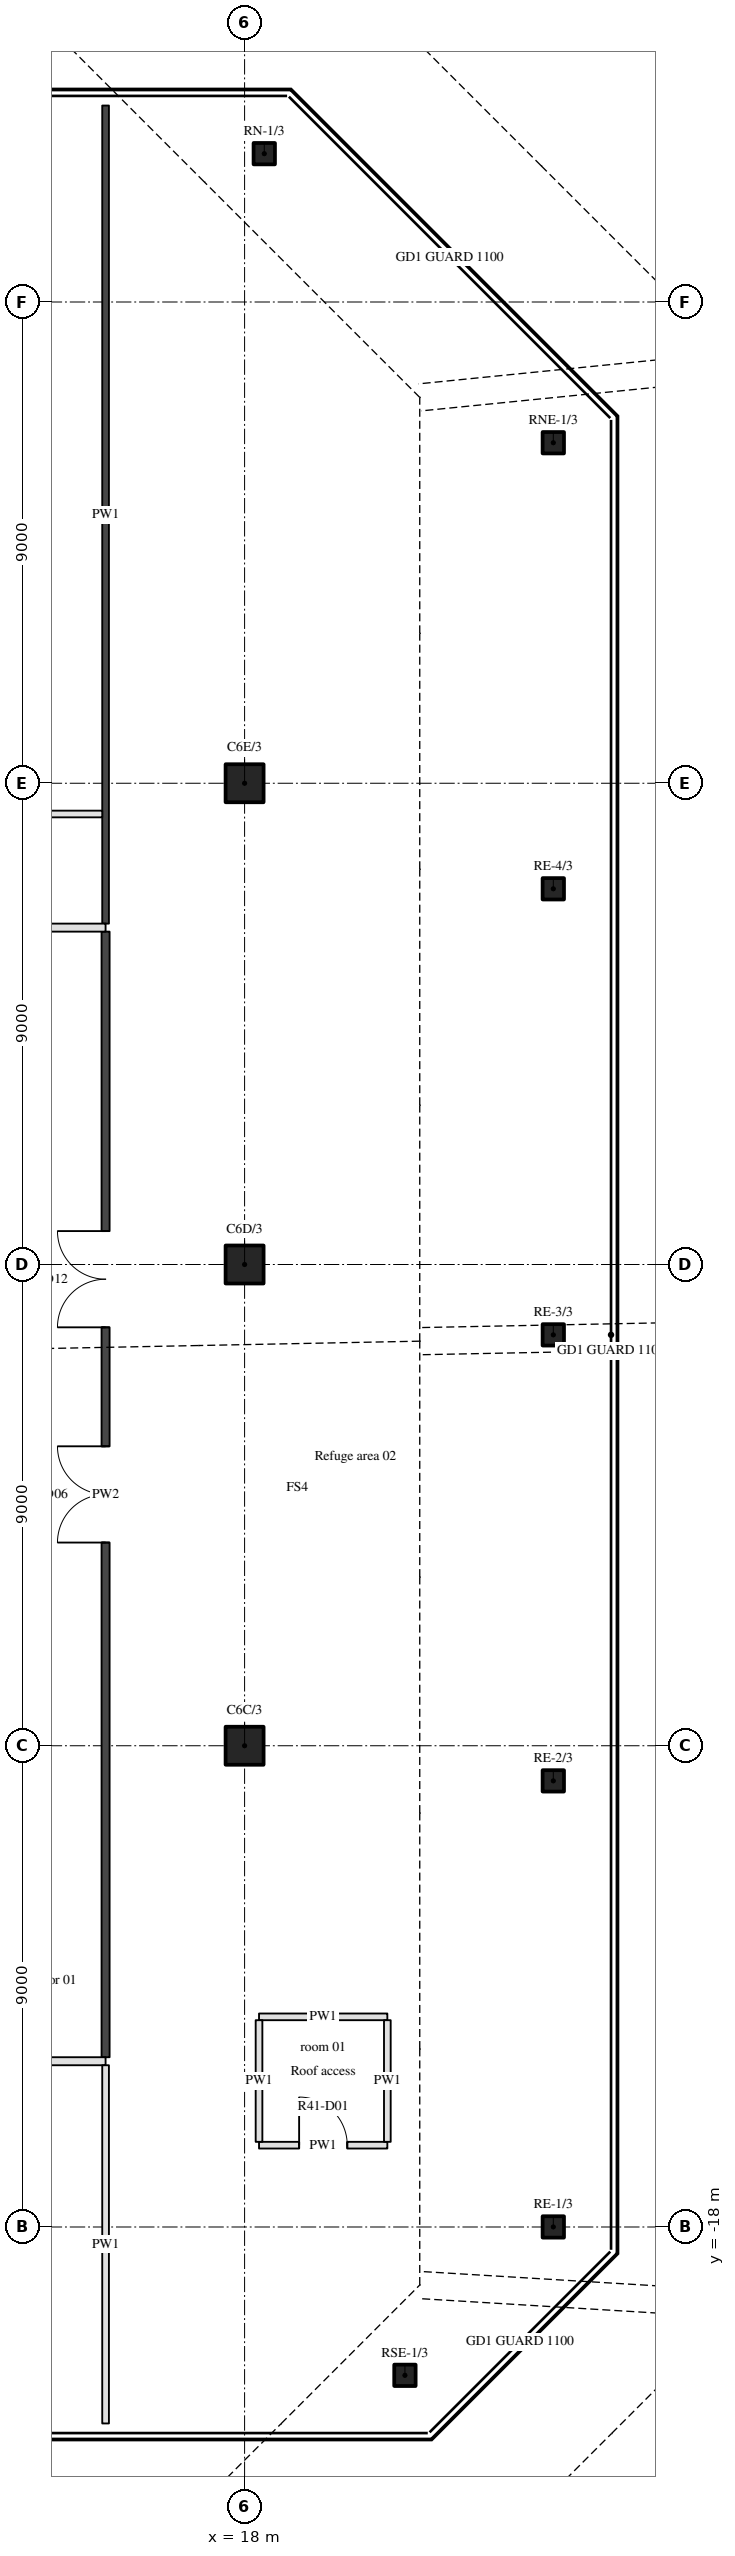
"""IFC4 building model, lengths in metres.
Left out: names, types, materials, properties, quantities, classifications, styles, units other than length and angle.
Written with IfcOpenShell. Run it as: python <this file> out.ifc"""

import sys

from ifc_helpers import new_model, si_unit, direction, frame, frame_2d, origin, origin_2d, place, context, subcontext, project, spatial, rectangle, hollow_rectangle, hollow_circle, extrude, element, fill, save


model = new_model("IFC4")
c1 = context("Model", 3, precision=1e-05, world=origin(), true_north=direction((0.0, 1.0)))
c2 = subcontext(c1, "Body", "Model", "MODEL_VIEW")
j1 = project(units=[si_unit("LENGTHUNIT", "METRE"), si_unit("PLANEANGLEUNIT", "RADIAN")], contexts=[c1])
p1 = place(None, origin())
s1 = spatial("IfcSite", under=j1, at=p1, CompositionType="ELEMENT")
p2 = place(p1, origin())
s2 = spatial("IfcBuilding", under=s1, at=p2, CompositionType="ELEMENT")
p3 = place(p2, frame((0.0, 0.0, 167.7)))
s3 = spatial("IfcBuildingStorey", under=s2, at=p3, CompositionType="ELEMENT", Elevation=167.7)
for number, where, z_axis, x_axis in (
    (1, (18.0, -9.0, 0.0), (0.0, 0.0, 1.0), (1.0, 0.0, 0.0)),
    (2, (18.0, 0.0, 0.0), (0.0, 0.0, 1.0), (1.0, 0.0, 0.0)),
    (3, (18.0, 9.0, 0.0), (0.0, 0.0, 1.0), (1.0, 0.0, 0.0)),
):
    element("IfcColumn", number, at=place(p3, frame(where, z_axis=z_axis, x_axis=x_axis)), inside=s3, PredefinedType="COLUMN", context=c2, shape_type="SweptSolid", body=[
        extrude(hollow_circle(Radius=0.355, WallThickness=0.032, at=origin_2d()), origin(), (0.0, 0.0, 1.0), 4.08),
    ])
for number, where, z_axis, x_axis in (
    (4, (20.999, -20.774, 0.0), (0.0, 0.0, 1.0), (1.0, 0.0, 0.0)),
    (5, (23.774, -17.999, 0.0), (0.0, 0.0, 1.0), (1.0, 0.0, 0.0)),
    (6, (23.774, -9.657, 0.0), (0.0, 0.0, 1.0), (1.0, 0.0, 0.0)),
    (7, (23.774, -1.316, 0.0), (0.0, 0.0, 1.0), (1.0, 0.0, 0.0)),
    (8, (23.774, 7.026, 0.0), (0.0, 0.0, 1.0), (1.0, 0.0, 0.0)),
    (9, (23.774, 15.368, 0.0), (0.0, 0.0, 1.0), (1.0, 0.0, 0.0)),
    (10, (18.368, 20.774, 0.0), (0.0, 0.0, 1.0), (1.0, 0.0, 0.0)),
):
    element("IfcColumn", number, at=place(p3, frame(where, z_axis=z_axis, x_axis=x_axis)), inside=s3, PredefinedType="COLUMN", context=c2, shape_type="SweptSolid", body=[
        extrude(hollow_rectangle(XDim=0.4, YDim=0.4, WallThickness=0.02, InnerFilletRadius=0.03, OuterFilletRadius=0.05, at=origin_2d()), origin(), (0.0, 0.0, 1.0), 4.25),
    ])
p4 = place(p3, frame((18.27, -16.47, 0.0), z_axis=(0.0, 0.0, 1.0), x_axis=(1.0, 0.0, 0.0)))
e11 = element("IfcWall", 11, at=p4, inside=s3, PredefinedType="PARTITIONING", context=c2, shape_type="SweptSolid", body=[
    extrude(rectangle(XDim=2.4, YDim=0.125, at=frame_2d((1.2, 0.0))), origin(), (0.0, 0.0, 1.0), 3.56),
])
p5 = place(p4, frame((0.75, 0.0, 0.0)))
e12 = element("IfcOpeningElement", 12, at=p5, cuts=e11, PredefinedType="OPENING", context=c2, shape_type="SweptSolid", body=[
    extrude(rectangle(XDim=0.9, YDim=2.1, at=frame_2d((0.45, 1.05))), frame((0.0, 0.073, 0.0), z_axis=(0.0, -1.0, 0.0), x_axis=(1.0, 0.0, 0.0)), (0.0, 0.0, 1.0), 0.145),
])
p6 = place(p3, frame((-15.4, -14.9, 0.0), z_axis=(0.0, 0.0, 1.0), x_axis=(1.0, 0.0, 0.0)))
e13 = element("IfcWall", 13, at=p6, inside=s3, PredefinedType="PARTITIONING", context=c2, shape_type="SweptSolid", body=[
    extrude(rectangle(XDim=30.8, YDim=0.15, at=frame_2d((15.4, 0.0))), origin(), (0.0, 0.0, 1.0), 3.56),
])
p7 = place(p6, frame((14.5, 0.0, 0.0)))
e14 = element("IfcOpeningElement", 14, at=p7, cuts=e13, PredefinedType="OPENING", context=c2, shape_type="SweptSolid", body=[
    extrude(rectangle(XDim=1.8, YDim=2.1, at=frame_2d((0.9, 1.05))), frame((0.0, 0.085, 0.0), z_axis=(0.0, -1.0, 0.0), x_axis=(1.0, 0.0, 0.0)), (0.0, 0.0, 1.0), 0.17),
])
p8 = place(p6, frame((16.6, 0.0, 0.0)))
e15 = element("IfcOpeningElement", 15, at=p8, cuts=e13, PredefinedType="OPENING", context=c2, shape_type="SweptSolid", body=[
    extrude(rectangle(XDim=1.8, YDim=2.1, at=frame_2d((0.9, 1.05))), frame((0.0, 0.085, 0.0), z_axis=(0.0, -1.0, 0.0), x_axis=(1.0, 0.0, 0.0)), (0.0, 0.0, 1.0), 0.17),
])
p9 = place(p3, frame((18.27, -14.07, 0.0), z_axis=(0.0, 0.0, 1.0), x_axis=(1.0, 0.0, 0.0)))
e16 = element("IfcWall", 16, at=p9, inside=s3, PredefinedType="PARTITIONING", context=c2, shape_type="SweptSolid", body=[
    extrude(rectangle(XDim=2.4, YDim=0.125, at=frame_2d((1.2, 0.0))), origin(), (0.0, 0.0, 1.0), 3.56),
])
p10 = place(p3, frame((15.4, 6.3, 0.0), z_axis=(0.0, 0.0, 1.0), x_axis=(-1.0, 0.0, 0.0)))
e17 = element("IfcWall", 17, at=p10, inside=s3, PredefinedType="PARTITIONING", context=c2, shape_type="SweptSolid", body=[
    extrude(rectangle(XDim=15.95, YDim=0.15, at=frame_2d((7.975, 0.0))), origin(), (0.0, 0.0, 1.0), 3.56),
])
p11 = place(p10, frame((11.167, 0.0, 0.0)))
e18 = element("IfcOpeningElement", 18, at=p11, cuts=e17, PredefinedType="OPENING", context=c2, shape_type="SweptSolid", body=[
    extrude(rectangle(XDim=1.0, YDim=2.1, at=frame_2d((0.5, 1.05))), frame((0.0, 0.085, 0.0), z_axis=(0.0, -1.0, 0.0), x_axis=(1.0, 0.0, 0.0)), (0.0, 0.0, 1.0), 0.17),
])
p12 = place(p10, frame((14.475, 0.0, 0.0)))
e19 = element("IfcOpeningElement", 19, at=p12, cuts=e17, PredefinedType="OPENING", context=c2, shape_type="SweptSolid", body=[
    extrude(rectangle(XDim=1.0, YDim=2.1, at=frame_2d((0.5, 1.05))), frame((0.0, 0.085, 0.0), z_axis=(0.0, -1.0, 0.0), x_axis=(1.0, 0.0, 0.0)), (0.0, 0.0, 1.0), 0.17),
])
p13 = place(p10, frame((6.55, 0.0, 0.0)))
e20 = element("IfcOpeningElement", 20, at=p13, cuts=e17, PredefinedType="OPENING", context=c2, shape_type="SweptSolid", body=[
    extrude(rectangle(XDim=0.9, YDim=2.1, at=frame_2d((0.45, 1.05))), frame((0.0, 0.085, 0.0), z_axis=(0.0, -1.0, 0.0), x_axis=(1.0, 0.0, 0.0)), (0.0, 0.0, 1.0), 0.17),
])
p14 = place(p10, frame((1.884, 0.0, 0.0)))
e21 = element("IfcOpeningElement", 21, at=p14, cuts=e17, PredefinedType="OPENING", context=c2, shape_type="SweptSolid", body=[
    extrude(rectangle(XDim=0.9, YDim=2.1, at=frame_2d((0.45, 1.05))), frame((0.0, 0.085, 0.0), z_axis=(0.0, -1.0, 0.0), x_axis=(1.0, 0.0, 0.0)), (0.0, 0.0, 1.0), 0.17),
])
p15 = place(p3, frame((6.142, 8.425, 0.0), z_axis=(0.0, 0.0, 1.0), x_axis=(1.0, 0.0, 0.0)))
e22 = element("IfcWall", 22, at=p15, inside=s3, PredefinedType="PARTITIONING", context=c2, shape_type="SweptSolid", body=[
    extrude(rectangle(XDim=9.195, YDim=0.125, at=frame_2d((4.598, 0.0))), origin(), (0.0, 0.0, 1.0), 3.56),
])
p16 = place(p3, frame((15.4, -21.674, 0.0), z_axis=(0.0, 0.0, 1.0), x_axis=(0.0, 1.0, 0.0)))
e23 = element("IfcWall", 23, at=p16, inside=s3, PredefinedType="PARTITIONING", context=c2, shape_type="SweptSolid", body=[
    extrude(rectangle(XDim=6.699, YDim=0.125, at=frame_2d((3.35, 0.0))), origin(), (0.0, 0.0, 1.0), 3.56),
])
p17 = place(p3, frame((15.4, -14.825, 0.0), z_axis=(0.0, 0.0, 1.0), x_axis=(0.0, 1.0, 0.0)))
e24 = element("IfcWall", 24, at=p17, inside=s3, PredefinedType="PARTITIONING", context=c2, shape_type="SweptSolid", body=[
    extrude(rectangle(XDim=21.05, YDim=0.15, at=frame_2d((10.525, 0.0))), origin(), (0.0, 0.0, 1.0), 3.08),
])
p18 = place(p17, frame((9.625, 0.0, 0.0)))
e25 = element("IfcOpeningElement", 25, at=p18, cuts=e24, PredefinedType="OPENING", context=c2, shape_type="SweptSolid", body=[
    extrude(rectangle(XDim=1.8, YDim=2.1, at=frame_2d((0.9, 1.05))), frame((0.0, 0.085, 0.0), z_axis=(0.0, -1.0, 0.0), x_axis=(1.0, 0.0, 0.0)), (0.0, 0.0, 1.0), 0.17),
])
p19 = place(p17, frame((13.65, 0.0, 0.0)))
e26 = element("IfcOpeningElement", 26, at=p19, cuts=e24, PredefinedType="OPENING", context=c2, shape_type="SweptSolid", body=[
    extrude(rectangle(XDim=1.8, YDim=2.1, at=frame_2d((0.9, 1.05))), frame((0.0, 0.085, 0.0), z_axis=(0.0, -1.0, 0.0), x_axis=(1.0, 0.0, 0.0)), (0.0, 0.0, 1.0), 0.17),
])
p20 = place(p3, frame((15.4, 6.375, 0.0), z_axis=(0.0, 0.0, 1.0), x_axis=(0.0, 1.0, 0.0)))
e27 = element("IfcWall", 27, at=p20, inside=s3, PredefinedType="PARTITIONING", context=c2, shape_type="SweptSolid", body=[
    extrude(rectangle(XDim=15.299, YDim=0.125, at=frame_2d((7.649, 0.0))), origin(), (0.0, 0.0, 1.0), 3.08),
])
for number, where, z_axis, x_axis in (
    (28, (18.27, -16.407, 0.0), (0.0, 0.0, 1.0), (0.0, 1.0, 0.0)),
    (29, (20.67, -16.407, 0.0), (0.0, 0.0, 1.0), (0.0, 1.0, 0.0)),
):
    element("IfcWall", number, at=place(p3, frame(where, z_axis=z_axis, x_axis=x_axis)), inside=s3, PredefinedType="PARTITIONING", context=c2, shape_type="SweptSolid", body=[
        extrude(rectangle(XDim=2.275, YDim=0.125, at=frame_2d((1.137, 0.0))), origin(), (0.0, 0.0, 1.0), 3.56),
    ])
p21 = place(p18, origin())
e30 = element("IfcDoor", 30, at=p21, inside=s3, OperationType="DOUBLE_DOOR_SINGLE_SWING", PredefinedType="DOOR", context=c2, shape_type="SweptSolid", body=[
    extrude(rectangle(XDim=1.8, YDim=2.1, at=frame_2d((0.9, 1.05))), frame((0.0, 0.025, 0.0), z_axis=(0.0, -1.0, 0.0), x_axis=(1.0, 0.0, 0.0)), (0.0, 0.0, 1.0), 0.05),
])
fill(e25, e30)
p22 = place(p5, origin())
e31 = element("IfcDoor", 31, at=p22, inside=s3, OperationType="SINGLE_SWING_LEFT", PredefinedType="DOOR", context=c2, shape_type="SweptSolid", body=[
    extrude(rectangle(XDim=0.9, YDim=2.1, at=frame_2d((0.45, 1.05))), frame((0.0, 0.025, 0.0), z_axis=(0.0, -1.0, 0.0), x_axis=(1.0, 0.0, 0.0)), (0.0, 0.0, 1.0), 0.05),
])
fill(e12, e31)
p23 = place(p19, origin())
e32 = element("IfcDoor", 32, at=p23, inside=s3, OperationType="DOUBLE_DOOR_SINGLE_SWING", PredefinedType="DOOR", context=c2, shape_type="SweptSolid", body=[
    extrude(rectangle(XDim=1.8, YDim=2.1, at=frame_2d((0.9, 1.05))), frame((0.0, 0.025, 0.0), z_axis=(0.0, -1.0, 0.0), x_axis=(1.0, 0.0, 0.0)), (0.0, 0.0, 1.0), 0.05),
])
fill(e26, e32)
save(model, sys.argv[1])
